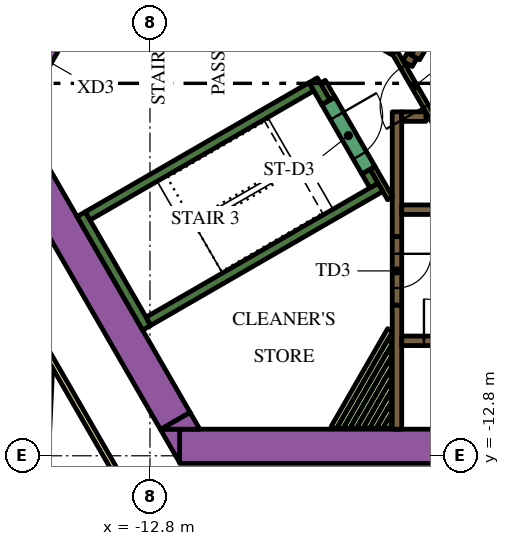
"""IFC4 building model, lengths in metres.
Left out: names, types, materials, properties, quantities, classifications, styles, units other than length and angle.
Written with IfcOpenShell. Run it as: python <this file> out.ifc"""

import sys

from ifc_helpers import new_model, si_unit, direction, frame, frame_2d, origin, place, context, subcontext, project, spatial, polyline, rectangle, outline, extrude, element, fill, save


model = new_model("IFC4")
c1 = context("Model", 3, precision=1e-05, world=origin(), true_north=direction((0.0, 1.0)))
c2 = subcontext(c1, "Body", "Model", "MODEL_VIEW")
j1 = project(units=[si_unit("LENGTHUNIT", "METRE"), si_unit("PLANEANGLEUNIT", "RADIAN")], contexts=[c1])
p1 = place(None, origin())
s1 = spatial("IfcSite", under=j1, at=p1, CompositionType="ELEMENT")
p2 = place(p1, origin())
s2 = spatial("IfcBuilding", under=s1, at=p2, CompositionType="ELEMENT")
p3 = place(p2, frame((0.0, 0.0, 70.5)))
s3 = spatial("IfcBuildingStorey", under=s2, at=p3, CompositionType="ELEMENT", Elevation=70.5)
p4 = place(p3, frame((-12.019, -12.55, 0.0), z_axis=(0.0, 0.0, 1.0), x_axis=(1.0, 0.0, 0.0)))
e1 = element("IfcWall", 1, at=p4, inside=s3, PredefinedType="SOLIDWALL", context=c2, shape_type="SweptSolid", body=[
    extrude(rectangle(XDim=21.63, YDim=0.9, at=frame_2d((10.815, 0.0))), origin(), (0.0, 0.0, 1.0), 3.9),
])
p5 = place(p3, origin())
e2 = element("IfcWall", 2, at=p5, inside=s3, PredefinedType="SOLIDWALL", context=c2, shape_type="SweptSolid", body=[
    extrude(outline(polyline([(-12.529, -12.1), (-12.021, -12.1), (-12.021, -12.98), (-12.529, -12.1)])), origin(), (0.0, 0.0, 1.0), 3.9),
])
p6 = place(p3, frame((-12.134, -11.883, 0.0), z_axis=(0.0, 0.0, 1.0), x_axis=(-0.500005339912, 0.866022320763, 0.0)))
e3 = element("IfcWall", 3, at=p6, inside=s3, PredefinedType="SOLIDWALL", context=c2, shape_type="SweptSolid", body=[
    extrude(rectangle(XDim=9.488, YDim=0.9, at=frame_2d((4.744, 0.0))), origin(), (0.0, 0.0, 1.0), 3.9),
])
e4 = element("IfcWall", 4, at=p5, inside=s3, PredefinedType="SOLIDWALL", context=c2, shape_type="SweptSolid", body=[
    extrude(outline(polyline([(-11.489, -12.1), (-12.505, -12.1), (-11.743, -11.66), (-11.489, -12.1)])), origin(), (0.0, 0.0, 1.0), 3.9),
])
p7 = place(p3, frame((-12.885, -9.431, 0.0), z_axis=(0.0, 0.0, 1.0), x_axis=(-0.500020560727, 0.866013532718, 0.0)))
e5 = element("IfcWall", 5, at=p7, inside=s3, PredefinedType="SOLIDWALL", context=c2, shape_type="SweptSolid", body=[
    extrude(rectangle(XDim=3.45, YDim=0.25, at=frame_2d((1.725, 0.0))), origin(), (0.0, 0.0, 1.0), 3.9),
])
p8 = place(p3, frame((-14.44, -6.49, 0.0), z_axis=(0.0, 0.0, 1.0), x_axis=(0.866022966069, 0.500004222222, 0.0)))
e6 = element("IfcWall", 6, at=p8, inside=s3, PredefinedType="SOLIDWALL", context=c2, shape_type="SweptSolid", body=[
    extrude(rectangle(XDim=6.8, YDim=0.25, at=frame_2d((3.4, 0.0))), origin(), (0.0, 0.0, 1.0), 3.9),
])
p9 = place(p3, frame((-8.168, -3.503, 0.0), z_axis=(0.0, 0.0, 1.0), x_axis=(-0.499952099219, 0.866053057547, 0.0)))
e7 = element("IfcWall", 7, at=p9, inside=s3, PredefinedType="SOLIDWALL", context=c2, shape_type="SweptSolid", body=[
    extrude(rectangle(XDim=0.675, YDim=0.25, at=frame_2d((0.337, 0.0))), origin(), (0.0, 0.0, 1.0), 3.9),
])
p10 = place(p3, frame((-12.84, -9.261, 0.0), z_axis=(0.0, 0.0, 1.0), x_axis=(0.866016039709, 0.500016218704, 0.0)))
e8 = element("IfcWall", 8, at=p10, inside=s3, PredefinedType="SOLIDWALL", context=c2, shape_type="SweptSolid", body=[
    extrude(rectangle(XDim=7.05, YDim=0.25, at=frame_2d((3.525, 0.0))), origin(), (0.0, 0.0, 1.0), 3.9),
])
p11 = place(p3, frame((-6.905, -5.69, 0.0), z_axis=(0.0, 0.0, 1.0), x_axis=(-0.500402024738, 0.865793170242, 0.0)))
e9 = element("IfcWall", 9, at=p11, inside=s3, PredefinedType="SOLIDWALL", context=c2, shape_type="SweptSolid", body=[
    extrude(rectangle(XDim=0.425, YDim=0.25, at=frame_2d((0.212, 0.0))), origin(), (0.0, 0.0, 1.0), 3.9),
])
p12 = place(p3, frame((-6.3, -12.1, 0.0), z_axis=(0.0, 0.0, 1.0), x_axis=(0.0, 1.0, 0.0)))
e10 = element("IfcWall", 10, at=p12, inside=s3, PredefinedType="SOLIDWALL", context=c2, shape_type="SweptSolid", body=[
    extrude(rectangle(XDim=3.265, YDim=0.25, at=frame_2d((1.632, 0.0))), origin(), (0.0, 0.0, 1.0), 3.9),
])
p13 = place(p3, frame((-6.3, -7.035, 0.0), z_axis=(0.0, 0.0, 1.0), x_axis=(0.0, 1.0, 0.0)))
e11 = element("IfcWall", 11, at=p13, inside=s3, PredefinedType="SOLIDWALL", context=c2, shape_type="SweptSolid", body=[
    extrude(rectangle(XDim=3.285, YDim=0.25, at=frame_2d((1.643, 0.0))), origin(), (0.0, 0.0, 1.0), 3.9),
])
p14 = place(p3, frame((-6.175, -3.875, 0.0), z_axis=(0.0, 0.0, 1.0), x_axis=(1.0, 0.0, 0.0)))
e12 = element("IfcWall", 12, at=p14, inside=s3, PredefinedType="SOLIDWALL", context=c2, shape_type="SweptSolid", body=[
    extrude(rectangle(XDim=0.637, YDim=0.25, at=frame_2d((0.318, 0.0))), origin(), (0.0, 0.0, 1.0), 3.9),
])
p15 = place(p3, frame((-6.088, -2.305, 0.0), z_axis=(0.0, 0.0, 1.0), x_axis=(0.866059450854, -0.499941024108, 0.0)))
e13 = element("IfcWall", 13, at=p15, inside=s3, PredefinedType="SOLIDWALL", context=c2, shape_type="SweptSolid", body=[
    extrude(rectangle(XDim=0.29, YDim=0.25, at=frame_2d((0.145, 0.0))), origin(), (0.0, 0.0, 1.0), 3.9),
])
p16 = place(p3, frame((-7.889, -1.265, 0.0), z_axis=(0.0, 0.0, 1.0), x_axis=(0.865986741702, -0.500066958712, 0.0)))
e14 = element("IfcWall", 14, at=p16, inside=s3, PredefinedType="SOLIDWALL", context=c2, shape_type="SweptSolid", body=[
    extrude(rectangle(XDim=1.738, YDim=0.25, at=frame_2d((0.869, 0.0))), origin(), (0.0, 0.0, 1.0), 3.9),
])
p17 = place(p3, frame((-7.968, -12.068, 0.0), z_axis=(0.0, 0.0, 1.0), x_axis=(0.500013701029, 0.866017493347, 0.0)))
e15 = element("IfcWall", 15, at=p17, inside=s3, PredefinedType="PARTITIONING", context=c2, shape_type="SweptSolid", body=[
    extrude(rectangle(XDim=2.975, YDim=0.15, at=frame_2d((1.488, 0.0))), origin(), (0.0, 0.0, 1.0), 2.75),
])
p18 = place(p3, frame((-7.794, -12.068, 0.0), z_axis=(0.0, 0.0, 1.0), x_axis=(0.499985098601, 0.86603400694, 0.0)))
e16 = element("IfcWall", 16, at=p18, inside=s3, PredefinedType="PARTITIONING", context=c2, shape_type="SweptSolid", body=[
    extrude(rectangle(XDim=2.628, YDim=0.15, at=frame_2d((1.314, 0.0))), origin(), (0.0, 0.0, 1.0), 2.75),
])
p19 = place(p3, frame((-7.621, -12.068, 0.0), z_axis=(0.0, 0.0, 1.0), x_axis=(0.500028047758, 0.866009209798, 0.0)))
e17 = element("IfcWall", 17, at=p19, inside=s3, PredefinedType="PARTITIONING", context=c2, shape_type="SweptSolid", body=[
    extrude(rectangle(XDim=2.282, YDim=0.15, at=frame_2d((1.141, 0.0))), origin(), (0.0, 0.0, 1.0), 2.75),
])
p20 = place(p3, frame((-7.448, -12.068, 0.0), z_axis=(0.0, 0.0, 1.0), x_axis=(0.500031751504, 0.866007071269, 0.0)))
e18 = element("IfcWall", 18, at=p20, inside=s3, PredefinedType="PARTITIONING", context=c2, shape_type="SweptSolid", body=[
    extrude(rectangle(XDim=1.936, YDim=0.15, at=frame_2d((0.968, 0.0))), origin(), (0.0, 0.0, 1.0), 2.75),
])
p21 = place(p3, frame((-7.275, -12.068, 0.0), z_axis=(0.0, 0.0, 1.0), x_axis=(0.499988385283, 0.86603210944, 0.0)))
e19 = element("IfcWall", 19, at=p21, inside=s3, PredefinedType="PARTITIONING", context=c2, shape_type="SweptSolid", body=[
    extrude(rectangle(XDim=1.589, YDim=0.15, at=frame_2d((0.795, 0.0))), origin(), (0.0, 0.0, 1.0), 2.75),
])
p22 = place(p3, frame((-7.102, -12.068, 0.0), z_axis=(0.0, 0.0, 1.0), x_axis=(0.500068153333, 0.865986051864, 0.0)))
e20 = element("IfcWall", 20, at=p22, inside=s3, PredefinedType="PARTITIONING", context=c2, shape_type="SweptSolid", body=[
    extrude(rectangle(XDim=1.243, YDim=0.15, at=frame_2d((0.622, 0.0))), origin(), (0.0, 0.0, 1.0), 2.75),
])
p23 = place(p3, frame((-6.928, -12.068, 0.0), z_axis=(0.0, 0.0, 1.0), x_axis=(0.500005339912, 0.866022320763, 0.0)))
e21 = element("IfcWall", 21, at=p23, inside=s3, PredefinedType="PARTITIONING", context=c2, shape_type="SweptSolid", body=[
    extrude(rectangle(XDim=0.896, YDim=0.15, at=frame_2d((0.448, 0.0))), origin(), (0.0, 0.0, 1.0), 2.75),
])
p24 = place(p3, frame((-6.755, -12.068, 0.0), z_axis=(0.0, 0.0, 1.0), x_axis=(0.500196256984, 0.865912065108, 0.0)))
e22 = element("IfcWall", 22, at=p24, inside=s3, PredefinedType="PARTITIONING", context=c2, shape_type="SweptSolid", body=[
    extrude(rectangle(XDim=0.55, YDim=0.15, at=frame_2d((0.275, 0.0))), origin(), (0.0, 0.0, 1.0), 2.75),
])
p25 = place(p3, frame((-6.582, -12.068, 0.0), z_axis=(0.0, 0.0, 1.0), x_axis=(0.499618727529, 0.866245419672, 0.0)))
e23 = element("IfcWall", 23, at=p25, inside=s3, PredefinedType="PARTITIONING", context=c2, shape_type="SweptSolid", body=[
    extrude(rectangle(XDim=0.204, YDim=0.15, at=frame_2d((0.102, 0.0))), origin(), (0.0, 0.0, 1.0), 2.75),
])
p26 = place(p3, frame((-6.48, -6.027, 0.0), z_axis=(0.0, 0.0, 1.0), x_axis=(-0.499927229454, 0.866067413802, 0.0)))
e24 = element("IfcWall", 24, at=p26, inside=s3, PredefinedType="PARTITIONING", context=c2, shape_type="SweptSolid", body=[
    extrude(rectangle(XDim=0.929, YDim=0.15, at=frame_2d((0.464, 0.0))), origin(), (0.0, 0.0, 1.0), 3.9),
])
p27 = place(p3, frame((-8.252, -2.958, 0.0), z_axis=(0.0, 0.0, 1.0), x_axis=(0.500174715838, -0.865924508047, 0.0)))
e25 = element("IfcWall", 25, at=p27, inside=s3, PredefinedType="PARTITIONING", context=c2, shape_type="SweptSolid", body=[
    extrude(rectangle(XDim=0.514, YDim=0.15, at=frame_2d((0.257, 0.0))), origin(), (0.0, 0.0, 1.0), 2.75),
])
p28 = place(p3, frame((-6.175, -9.775, 0.0), z_axis=(0.0, 0.0, 1.0), x_axis=(1.0, 0.0, 0.0)))
e26 = element("IfcWall", 26, at=p28, inside=s3, PredefinedType="SOLIDWALL", context=c2, shape_type="SweptSolid", body=[
    extrude(rectangle(XDim=12.35, YDim=0.25, at=frame_2d((6.175, 0.0))), origin(), (0.0, 0.0, 1.0), 3.9),
])
p29 = place(p28, frame((0.585, 0.0, 0.0)))
e27 = element("IfcOpeningElement", 27, at=p29, cuts=e26, PredefinedType="OPENING", context=c2, shape_type="SweptSolid", body=[
    extrude(rectangle(XDim=1.1, YDim=2.1, at=frame_2d((0.55, 1.05))), frame((0.0, 0.135, 0.0), z_axis=(0.0, -1.0, 0.0), x_axis=(1.0, 0.0, 0.0)), (0.0, 0.0, 1.0), 0.27),
])
p30 = place(p28, frame((3.105, 0.0, 0.0)))
e28 = element("IfcOpeningElement", 28, at=p30, cuts=e26, PredefinedType="OPENING", context=c2, shape_type="SweptSolid", body=[
    extrude(rectangle(XDim=1.1, YDim=2.1, at=frame_2d((0.55, 1.05))), frame((0.0, 0.135, 0.0), z_axis=(0.0, -1.0, 0.0), x_axis=(1.0, 0.0, 0.0)), (0.0, 0.0, 1.0), 0.27),
])
p31 = place(p28, frame((5.625, 0.0, 0.0)))
e29 = element("IfcOpeningElement", 29, at=p31, cuts=e26, PredefinedType="OPENING", context=c2, shape_type="SweptSolid", body=[
    extrude(rectangle(XDim=1.1, YDim=2.1, at=frame_2d((0.55, 1.05))), frame((0.0, 0.135, 0.0), z_axis=(0.0, -1.0, 0.0), x_axis=(1.0, 0.0, 0.0)), (0.0, 0.0, 1.0), 0.27),
])
p32 = place(p28, frame((8.145, 0.0, 0.0)))
e30 = element("IfcOpeningElement", 30, at=p32, cuts=e26, PredefinedType="OPENING", context=c2, shape_type="SweptSolid", body=[
    extrude(rectangle(XDim=1.1, YDim=2.1, at=frame_2d((0.55, 1.05))), frame((0.0, 0.135, 0.0), z_axis=(0.0, -1.0, 0.0), x_axis=(1.0, 0.0, 0.0)), (0.0, 0.0, 1.0), 0.27),
])
p33 = place(p28, frame((10.665, 0.0, 0.0)))
e31 = element("IfcOpeningElement", 31, at=p33, cuts=e26, PredefinedType="OPENING", context=c2, shape_type="SweptSolid", body=[
    extrude(rectangle(XDim=1.1, YDim=2.1, at=frame_2d((0.55, 1.05))), frame((0.0, 0.135, 0.0), z_axis=(0.0, -1.0, 0.0), x_axis=(1.0, 0.0, 0.0)), (0.0, 0.0, 1.0), 0.27),
])
p34 = place(p3, frame((-6.175, -6.325, 0.0), z_axis=(0.0, 0.0, 1.0), x_axis=(1.0, 0.0, 0.0)))
e32 = element("IfcWall", 32, at=p34, inside=s3, PredefinedType="SOLIDWALL", context=c2, shape_type="SweptSolid", body=[
    extrude(rectangle(XDim=12.35, YDim=0.25, at=frame_2d((6.175, 0.0))), origin(), (0.0, 0.0, 1.0), 3.9),
])
p35 = place(p34, frame((3.205, 0.0, 0.0)))
e33 = element("IfcOpeningElement", 33, at=p35, cuts=e32, PredefinedType="OPENING", context=c2, shape_type="SweptSolid", body=[
    extrude(rectangle(XDim=0.9, YDim=2.1, at=frame_2d((0.45, 1.05))), frame((0.0, 0.135, 0.0), z_axis=(0.0, -1.0, 0.0), x_axis=(1.0, 0.0, 0.0)), (0.0, 0.0, 1.0), 0.27),
])
p36 = place(p34, frame((8.145, 0.0, 0.0)))
e34 = element("IfcOpeningElement", 34, at=p36, cuts=e32, PredefinedType="OPENING", context=c2, shape_type="SweptSolid", body=[
    extrude(rectangle(XDim=1.1, YDim=2.1, at=frame_2d((0.55, 1.05))), frame((0.0, 0.135, 0.0), z_axis=(0.0, -1.0, 0.0), x_axis=(1.0, 0.0, 0.0)), (0.0, 0.0, 1.0), 0.27),
])
p37 = place(p34, frame((10.665, 0.0, 0.0)))
e35 = element("IfcOpeningElement", 35, at=p37, cuts=e32, PredefinedType="OPENING", context=c2, shape_type="SweptSolid", body=[
    extrude(rectangle(XDim=1.1, YDim=2.1, at=frame_2d((0.55, 1.05))), frame((0.0, 0.135, 0.0), z_axis=(0.0, -1.0, 0.0), x_axis=(1.0, 0.0, 0.0)), (0.0, 0.0, 1.0), 0.27),
])
p38 = place(p3, frame((-0.898, 6.194, 0.0), z_axis=(0.0, 0.0, 1.0), x_axis=(-0.499996202215, -0.866027596426, 0.0)))
e36 = element("IfcWall", 36, at=p38, inside=s3, PredefinedType="SOLIDWALL", context=c2, shape_type="SweptSolid", body=[
    extrude(rectangle(XDim=9.83, YDim=0.25, at=frame_2d((4.915, 0.0))), origin(), (0.0, 0.0, 1.0), 3.9),
])
p39 = place(p38, frame((0.585, 0.0, 0.0)))
e37 = element("IfcOpeningElement", 37, at=p39, cuts=e36, PredefinedType="OPENING", context=c2, shape_type="SweptSolid", body=[
    extrude(rectangle(XDim=1.1, YDim=2.1, at=frame_2d((0.55, 1.05))), frame((0.0, 0.135, 0.0), z_axis=(0.0, -1.0, 0.0), x_axis=(1.0, 0.0, 0.0)), (0.0, 0.0, 1.0), 0.27),
])
p40 = place(p38, frame((3.105, 0.0, 0.0)))
e38 = element("IfcOpeningElement", 38, at=p40, cuts=e36, PredefinedType="OPENING", context=c2, shape_type="SweptSolid", body=[
    extrude(rectangle(XDim=1.1, YDim=2.1, at=frame_2d((0.55, 1.05))), frame((0.0, 0.135, 0.0), z_axis=(0.0, -1.0, 0.0), x_axis=(1.0, 0.0, 0.0)), (0.0, 0.0, 1.0), 0.27),
])
p41 = place(p38, frame((5.625, 0.0, 0.0)))
e39 = element("IfcOpeningElement", 39, at=p41, cuts=e36, PredefinedType="OPENING", context=c2, shape_type="SweptSolid", body=[
    extrude(rectangle(XDim=1.1, YDim=2.1, at=frame_2d((0.55, 1.05))), frame((0.0, 0.135, 0.0), z_axis=(0.0, -1.0, 0.0), x_axis=(1.0, 0.0, 0.0)), (0.0, 0.0, 1.0), 0.27),
])
p42 = place(p38, frame((8.145, 0.0, 0.0)))
e40 = element("IfcOpeningElement", 40, at=p42, cuts=e36, PredefinedType="OPENING", context=c2, shape_type="SweptSolid", body=[
    extrude(rectangle(XDim=1.1, YDim=2.1, at=frame_2d((0.55, 1.05))), frame((0.0, 0.135, 0.0), z_axis=(0.0, -1.0, 0.0), x_axis=(1.0, 0.0, 0.0)), (0.0, 0.0, 1.0), 0.27),
])
p43 = place(p3, frame((-8.103, -3.466, 0.0), z_axis=(0.0, 0.0, 1.0), x_axis=(0.500078061341, -0.865980330357, 0.0)))
e41 = element("IfcWall", 41, at=p43, inside=s3, PredefinedType="SOLIDWALL", context=c2, shape_type="SweptSolid", body=[
    extrude(rectangle(XDim=2.1, YDim=0.4, at=frame_2d((1.05, 0.0))), origin(), (0.0, 0.0, 1.0), 3.9),
])
p44 = place(p43, frame((0.45, 0.0, 0.0)))
e42 = element("IfcOpeningElement", 42, at=p44, cuts=e41, PredefinedType="OPENING", context=c2, shape_type="SweptSolid", body=[
    extrude(rectangle(XDim=1.2, YDim=2.1, at=frame_2d((0.6, 1.05))), frame((0.0, 0.21, 0.0), z_axis=(0.0, -1.0, 0.0), x_axis=(1.0, 0.0, 0.0)), (0.0, 0.0, 1.0), 0.42),
])
p45 = place(p3, frame((-6.3, -7.035, 0.0), z_axis=(0.0, 0.0, 1.0), x_axis=(0.0, -1.0, 0.0)))
e43 = element("IfcWall", 43, at=p45, inside=s3, PredefinedType="SOLIDWALL", context=c2, shape_type="SweptSolid", body=[
    extrude(rectangle(XDim=1.8, YDim=0.25, at=frame_2d((0.9, 0.0))), origin(), (0.0, 0.0, 1.0), 3.9),
])
p46 = place(p45, frame((0.45, 0.0, 0.0)))
e44 = element("IfcOpeningElement", 44, at=p46, cuts=e43, PredefinedType="OPENING", context=c2, shape_type="SweptSolid", body=[
    extrude(rectangle(XDim=0.9, YDim=2.1, at=frame_2d((0.45, 1.05))), frame((0.0, 0.135, 0.0), z_axis=(0.0, -1.0, 0.0), x_axis=(1.0, 0.0, 0.0)), (0.0, 0.0, 1.0), 0.27),
])
p47 = place(p3, frame((-5.317, -3.99, 0.0), z_axis=(0.0, 0.0, 1.0), x_axis=(-0.500027713859, 0.866009402589, 0.0)))
e45 = element("IfcWall", 45, at=p47, inside=s3, PredefinedType="PARTITIONING", context=c2, shape_type="SweptSolid", body=[
    extrude(rectangle(XDim=2.1, YDim=0.15, at=frame_2d((1.05, 0.0))), origin(), (0.0, 0.0, 1.0), 3.9),
])
p48 = place(p47, frame((0.45, 0.0, 0.0)))
e46 = element("IfcOpeningElement", 46, at=p48, cuts=e45, PredefinedType="OPENING", context=c2, shape_type="SweptSolid", body=[
    extrude(rectangle(XDim=1.2, YDim=2.1, at=frame_2d((0.6, 1.05))), frame((0.0, 0.085, 0.0), z_axis=(0.0, -1.0, 0.0), x_axis=(1.0, 0.0, 0.0)), (0.0, 0.0, 1.0), 0.17),
])
p49 = place(p3, frame((-16.209, -2.976, 0.0), z_axis=(0.0, 0.0, 1.0), x_axis=(0.499954529098, 0.86605165483, 0.0)))
e47 = element("IfcWall", 47, at=p49, inside=s3, PredefinedType="SOLIDWALL", context=c2, shape_type="SweptSolid", body=[
    extrude(rectangle(XDim=1.7, YDim=0.9, at=frame_2d((0.85, 0.0))), origin(), (0.0, 0.0, 1.0), 3.9),
])
p50 = place(p49, frame((0.25, 0.0, 0.0)))
e48 = element("IfcOpeningElement", 48, at=p50, cuts=e47, PredefinedType="OPENING", context=c2, shape_type="SweptSolid", body=[
    extrude(rectangle(XDim=1.2, YDim=2.1, at=frame_2d((0.6, 1.05))), frame((0.0, 0.46, 0.0), z_axis=(0.0, -1.0, 0.0), x_axis=(1.0, 0.0, 0.0)), (0.0, 0.0, 1.0), 0.92),
])
p51 = place(p3, frame((-19.081, -3.9, 0.0), z_axis=(0.0, 0.0, 1.0), x_axis=(0.499998313975, 0.866026377209, 0.0)))
e49 = element("IfcWall", 49, at=p51, inside=s3, PredefinedType="PARTITIONING", context=c2, shape_type="SweptSolid", body=[
    extrude(rectangle(XDim=25.766, YDim=0.15, at=frame_2d((12.883, 0.0))), origin(), (0.0, 0.0, 1.0), 2.75),
])
p52 = place(p51, frame((24.586, 0.0, 0.0)))
e50 = element("IfcOpeningElement", 50, at=p52, cuts=e49, PredefinedType="OPENING", context=c2, shape_type="SweptSolid", body=[
    extrude(rectangle(XDim=1.0, YDim=2.1, at=frame_2d((0.5, 1.05))), frame((0.0, 0.085, 0.0), z_axis=(0.0, -1.0, 0.0), x_axis=(1.0, 0.0, 0.0)), (0.0, 0.0, 1.0), 0.17),
])
p53 = place(p51, frame((9.948, 0.0, 0.0)))
e51 = element("IfcOpeningElement", 51, at=p53, cuts=e49, PredefinedType="OPENING", context=c2, shape_type="SweptSolid", body=[
    extrude(rectangle(XDim=1.0, YDim=2.1, at=frame_2d((0.5, 1.05))), frame((0.0, 0.085, 0.0), z_axis=(0.0, -1.0, 0.0), x_axis=(1.0, 0.0, 0.0)), (0.0, 0.0, 1.0), 0.17),
])
p54 = place(p51, frame((7.782, 0.0, 0.0)))
e52 = element("IfcOpeningElement", 52, at=p54, cuts=e49, PredefinedType="OPENING", context=c2, shape_type="SweptSolid", body=[
    extrude(rectangle(XDim=0.9, YDim=2.1, at=frame_2d((0.45, 1.05))), frame((0.0, 0.085, 0.0), z_axis=(0.0, -1.0, 0.0), x_axis=(1.0, 0.0, 0.0)), (0.0, 0.0, 1.0), 0.17),
])
p55 = place(p51, frame((4.658, 0.0, 0.0)))
e53 = element("IfcOpeningElement", 53, at=p55, cuts=e49, PredefinedType="OPENING", context=c2, shape_type="SweptSolid", body=[
    extrude(rectangle(XDim=0.9, YDim=2.1, at=frame_2d((0.45, 1.05))), frame((0.0, 0.085, 0.0), z_axis=(0.0, -1.0, 0.0), x_axis=(1.0, 0.0, 0.0)), (0.0, 0.0, 1.0), 0.17),
])
p56 = place(p3, frame((-12.918, -14.575, 0.0), z_axis=(0.0, 0.0, 1.0), x_axis=(-0.500009150678, 0.866020120573, 0.0)))
e54 = element("IfcWall", 54, at=p56, inside=s3, PredefinedType="PARTITIONING", context=c2, shape_type="SweptSolid", body=[
    extrude(rectangle(XDim=5.258, YDim=0.15, at=frame_2d((2.629, 0.0))), origin(), (0.0, 0.0, 1.0), 2.75),
])
p57 = place(p3, frame((-15.973, -22.109, 0.0), z_axis=(0.0, 0.0, 1.0), x_axis=(0.046191717129, 0.998932592955, 0.0)))
e55 = element("IfcWall", 55, at=p57, inside=s3, PredefinedType="PARTITIONING", context=c2, shape_type="SweptSolid", body=[
    extrude(rectangle(XDim=11.638, YDim=0.15, at=frame_2d((5.819, 0.0))), origin(), (0.0, 0.0, 1.0), 2.75),
])
p58 = place(p29, origin())
e56 = element("IfcDoor", 56, at=p58, inside=s3, OperationType="DOUBLE_DOOR_SLIDING", PredefinedType="DOOR", context=c2, shape_type="SweptSolid", body=[
    extrude(rectangle(XDim=1.1, YDim=2.1, at=frame_2d((0.55, 1.05))), frame((0.0, 0.025, 0.0), z_axis=(0.0, -1.0, 0.0), x_axis=(1.0, 0.0, 0.0)), (0.0, 0.0, 1.0), 0.05),
])
fill(e27, e56)
p59 = place(p44, origin())
e57 = element("IfcDoor", 57, at=p59, inside=s3, OperationType="SINGLE_SWING_LEFT", PredefinedType="DOOR", context=c2, shape_type="SweptSolid", body=[
    extrude(rectangle(XDim=1.2, YDim=2.1, at=frame_2d((0.6, 1.05))), frame((0.0, 0.025, 0.0), z_axis=(0.0, -1.0, 0.0), x_axis=(1.0, 0.0, 0.0)), (0.0, 0.0, 1.0), 0.05),
])
fill(e42, e57)
p60 = place(p46, origin())
e58 = element("IfcDoor", 58, at=p60, inside=s3, OperationType="SINGLE_SWING_LEFT", PredefinedType="DOOR", context=c2, shape_type="SweptSolid", body=[
    extrude(rectangle(XDim=0.9, YDim=2.1, at=frame_2d((0.45, 1.05))), frame((0.0, 0.025, 0.0), z_axis=(0.0, -1.0, 0.0), x_axis=(1.0, 0.0, 0.0)), (0.0, 0.0, 1.0), 0.05),
])
fill(e44, e58)
p61 = place(p48, origin())
e59 = element("IfcDoor", 59, at=p61, inside=s3, OperationType="SINGLE_SWING_LEFT", PredefinedType="DOOR", context=c2, shape_type="SweptSolid", body=[
    extrude(rectangle(XDim=1.2, YDim=2.1, at=frame_2d((0.6, 1.05))), frame((0.0, 0.025, 0.0), z_axis=(0.0, -1.0, 0.0), x_axis=(1.0, 0.0, 0.0)), (0.0, 0.0, 1.0), 0.05),
])
fill(e46, e59)
save(model, sys.argv[1])
